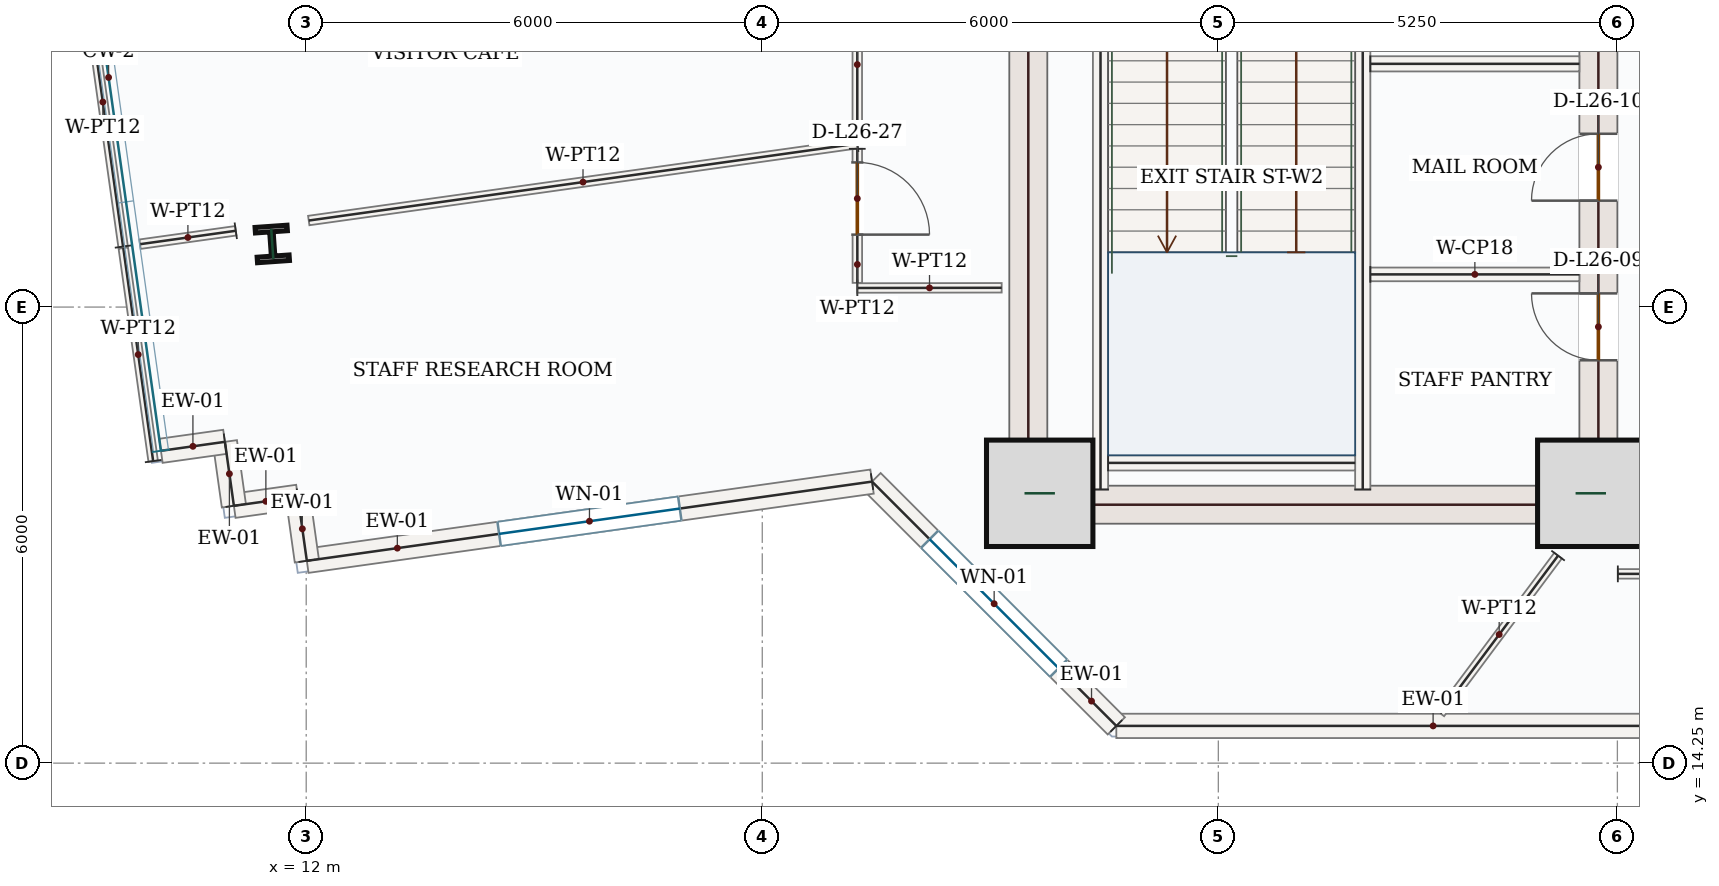
"""IFC4 building model, lengths in metres.
Left out: names, types, materials, properties, quantities, classifications, styles, units other than length and angle.
Written with IfcOpenShell. Run it as: python <this file> out.ifc"""

import sys

from ifc_helpers import new_model, si_unit, direction, frame, frame_2d, origin, origin_2d, place, context, subcontext, project, spatial, rectangle, i_section, extrude, source, transform, mapped, element, fill, save


model = new_model("IFC4")
c1 = context("Model", 3, precision=1e-05, world=origin(), true_north=direction((0.0, 1.0)))
c2 = subcontext(c1, "Body", "Model", "MODEL_VIEW")
j1 = project(units=[si_unit("LENGTHUNIT", "METRE"), si_unit("PLANEANGLEUNIT", "RADIAN")], contexts=[c1])
p1 = place(None, origin())
s1 = spatial("IfcSite", under=j1, at=p1, CompositionType="ELEMENT")
p2 = place(p1, origin())
s2 = spatial("IfcBuilding", under=s1, at=p2, CompositionType="ELEMENT")
p3 = place(p2, frame((0.0, 0.0, 117.3)))
s3 = spatial("IfcBuildingStorey", under=s2, at=p3, CompositionType="ELEMENT", Elevation=117.3)
m1 = source(origin(), c2, "Body", "SweptSolid", [
    extrude(rectangle(XDim=8.55, YDim=0.5, at=frame_2d((4.275, 0.0))), origin(), (0.0, 0.0, 1.0), 3.95),
])
p4 = place(p3, frame((21.5, 17.4, 0.0), z_axis=(0.0, 0.0, 1.0), x_axis=(0.0, 1.0, 0.0)))
e1 = element("IfcWall", 1, at=p4, inside=s3, PredefinedType="SHEAR", context=c2, shape_type="MappedRepresentation", body=[
    mapped(m1, transform((0.0, 0.0, 0.0), x_axis=(1.0, 0.0, 0.0), y_axis=(0.0, 1.0, 0.0), z_axis=(0.0, 0.0, 1.0), scale=1.0)),
])
p5 = place(p3, frame((29.0, 17.4, 0.0), z_axis=(0.0, 0.0, 1.0), x_axis=(0.0, 1.0, 0.0)))
e2 = element("IfcWall", 2, at=p5, inside=s3, PredefinedType="SHEAR", context=c2, shape_type="SweptSolid", body=[
    extrude(rectangle(XDim=8.55, YDim=0.5, at=frame_2d((4.275, 0.0))), origin(), (0.0, 0.0, 1.0), 3.95),
])
p6 = place(p5, frame((6.65, 0.0, 0.0)))
e3 = element("IfcOpeningElement", 3, at=p6, cuts=e2, PredefinedType="OPENING", context=c2, shape_type="SweptSolid", body=[
    extrude(rectangle(XDim=1.1, YDim=2.2, at=frame_2d((0.55, 1.1))), frame((0.0, 0.26, 0.0), z_axis=(0.0, -1.0, 0.0), x_axis=(1.0, 0.0, 0.0)), (0.0, 0.0, 1.0), 0.52),
])
p7 = place(p5, frame((2.15, 0.0, 0.0)))
e4 = element("IfcOpeningElement", 4, at=p7, cuts=e2, PredefinedType="OPENING", context=c2, shape_type="SweptSolid", body=[
    extrude(rectangle(XDim=0.88, YDim=2.1, at=frame_2d((0.44, 1.05))), frame((0.0, 0.26, 0.0), z_axis=(0.0, -1.0, 0.0), x_axis=(1.0, 0.0, 0.0)), (0.0, 0.0, 1.0), 0.52),
])
p8 = place(p5, frame((4.25, 0.0, 0.0)))
e5 = element("IfcOpeningElement", 5, at=p8, cuts=e2, PredefinedType="OPENING", context=c2, shape_type="SweptSolid", body=[
    extrude(rectangle(XDim=0.88, YDim=2.1, at=frame_2d((0.44, 1.05))), frame((0.0, 0.26, 0.0), z_axis=(0.0, -1.0, 0.0), x_axis=(1.0, 0.0, 0.0)), (0.0, 0.0, 1.0), 0.52),
])
m2 = source(origin(), c2, "Body", "SweptSolid", [
    extrude(rectangle(XDim=7.0, YDim=0.5, at=frame_2d((3.5, 0.0))), origin(), (0.0, 0.0, 1.0), 3.95),
])
p9 = place(p3, frame((21.75, 17.65, 0.0), z_axis=(0.0, 0.0, 1.0), x_axis=(1.0, 0.0, 0.0)))
e6 = element("IfcWall", 6, at=p9, inside=s3, PredefinedType="SHEAR", context=c2, shape_type="MappedRepresentation", body=[
    mapped(m2, transform((0.0, 0.0, 0.0), x_axis=(1.0, 0.0, 0.0), y_axis=(0.0, 1.0, 0.0), z_axis=(0.0, 0.0, 1.0), scale=1.0)),
])
m3 = source(origin(), c2, "Body", "SweptSolid", [
    extrude(rectangle(XDim=1.4, YDim=1.4, at=origin_2d()), origin(), (0.0, 0.0, 1.0), 4.2),
])
for number, where, z_axis, x_axis in (
    (7, (21.65, 17.8, 0.0), (0.0, 0.0, 1.0), (1.0, 0.0, 0.0)),
    (8, (28.9, 17.8, 0.0), (0.0, 0.0, 1.0), (1.0, 0.0, 0.0)),
):
    element("IfcColumn", number, at=place(p3, frame(where, z_axis=z_axis, x_axis=x_axis)), inside=s3, PredefinedType="COLUMN", context=c2, shape_type="MappedRepresentation", body=[
        mapped(m3, transform((0.0, 0.0, 0.0), x_axis=(1.0, 0.0, 0.0), y_axis=(0.0, 1.0, 0.0), z_axis=(0.0, 0.0, 1.0), scale=1.0)),
    ])
m4 = source(origin(), c2, "Body", "SweptSolid", [
    extrude(i_section(OverallWidth=0.421, OverallDepth=0.465, WebThickness=0.045, FlangeThickness=0.073, FilletRadius=0.018, at=origin_2d()), origin(), (0.0, 0.0, 1.0), 4.2),
])
p10 = place(p3, frame((11.553, 21.08, 0.0), z_axis=(0.0, 0.0, 1.0), x_axis=(0.99756405026, 0.069756473744, 0.0)))
e9 = element("IfcColumn", 9, at=p10, inside=s3, PredefinedType="COLUMN", context=c2, shape_type="MappedRepresentation", body=[
    mapped(m4, transform((0.0, 0.0, 0.0), x_axis=(1.0, 0.0, 0.0), y_axis=(0.0, 1.0, 0.0), z_axis=(0.0, 0.0, 1.0), scale=1.0)),
])
m5 = source(origin(), c2, "Body", "SweptSolid", [
    extrude(rectangle(XDim=8.335, YDim=0.32, at=frame_2d((4.168, 0.0))), origin(), (0.0, 0.0, 1.0), 3.95),
])
p11 = place(p3, frame((30.993, 14.74, 0.0), z_axis=(0.0, 0.0, 1.0), x_axis=(-1.0, 0.0, 0.0)))
e10 = element("IfcWall", 10, at=p11, inside=s3, PredefinedType="SOLIDWALL", context=c2, shape_type="MappedRepresentation", body=[
    mapped(m5, transform((0.0, 0.0, 0.0), x_axis=(1.0, 0.0, 0.0), y_axis=(0.0, 1.0, 0.0), z_axis=(0.0, 0.0, 1.0), scale=1.0)),
])
p12 = place(p3, frame((22.658, 14.74, 0.0), z_axis=(0.0, 0.0, 1.0), x_axis=(-0.707106781187, 0.707106781187, 0.0)))
e11 = element("IfcWall", 11, at=p12, inside=s3, PredefinedType="SOLIDWALL", context=c2, shape_type="SweptSolid", body=[
    extrude(rectangle(XDim=4.545, YDim=0.32, at=frame_2d((2.272, 0.0))), origin(), (0.0, 0.0, 1.0), 3.95),
])
p13 = place(p12, frame((1.073, 0.0, 0.85)))
e12 = element("IfcOpeningElement", 12, at=p13, cuts=e11, PredefinedType="OPENING", context=c2, shape_type="SweptSolid", body=[
    extrude(rectangle(XDim=2.4, YDim=1.8, at=frame_2d((1.2, 0.9))), frame((0.0, 0.17, 0.0), z_axis=(0.0, -1.0, 0.0), x_axis=(1.0, 0.0, 0.0)), (0.0, 0.0, 1.0), 0.34),
])
p14 = place(p3, frame((19.444, 17.954, 0.0), z_axis=(0.0, 0.0, 1.0), x_axis=(-0.990319321248, -0.138807931917, 0.0)))
e13 = element("IfcWall", 13, at=p14, inside=s3, PredefinedType="SOLIDWALL", context=c2, shape_type="SweptSolid", body=[
    extrude(rectangle(XDim=7.509, YDim=0.32, at=frame_2d((3.754, 0.0))), origin(), (0.0, 0.0, 1.0), 3.95),
])
p15 = place(p14, frame((2.554, 0.0, 0.85)))
e14 = element("IfcOpeningElement", 14, at=p15, cuts=e13, PredefinedType="OPENING", context=c2, shape_type="SweptSolid", body=[
    extrude(rectangle(XDim=2.4, YDim=1.8, at=frame_2d((1.2, 0.9))), frame((0.0, 0.17, 0.0), z_axis=(0.0, -1.0, 0.0), x_axis=(1.0, 0.0, 0.0)), (0.0, 0.0, 1.0), 0.34),
])
m6 = source(origin(), c2, "Body", "SweptSolid", [
    extrude(rectangle(XDim=0.85, YDim=0.32, at=frame_2d((0.425, 0.0))), origin(), (0.0, 0.0, 1.0), 3.95),
])
for number, where, z_axis, x_axis in (
    (15, (12.008, 16.912, 0.0), (0.0, 0.0, 1.0), (-0.139, 0.99, 0.0)),
    (16, (11.89, 17.753, 0.0), (0.0, 0.0, 1.0), (-0.99, -0.139, 0.0)),
):
    element("IfcWall", number, at=place(p3, frame(where, z_axis=z_axis, x_axis=x_axis)), inside=s3, PredefinedType="SOLIDWALL", context=c2, shape_type="MappedRepresentation", body=[
        mapped(m6, transform((0.0, 0.0, 0.0), x_axis=(1.0, 0.0, 0.0), y_axis=(0.0, 1.0, 0.0), z_axis=(0.0, 0.0, 1.0), scale=1.0)),
    ])
m7 = source(origin(), c2, "Body", "SweptSolid", [
    extrude(rectangle(XDim=0.85, YDim=0.32, at=frame_2d((0.425, 0.0))), origin(), (0.0, 0.0, 1.0), 3.95),
])
p16 = place(p3, frame((11.048, 17.635, 0.0), z_axis=(0.0, 0.0, 1.0), x_axis=(-0.138766190202, 0.990325171071, 0.0)))
e17 = element("IfcWall", 17, at=p16, inside=s3, PredefinedType="SOLIDWALL", context=c2, shape_type="MappedRepresentation", body=[
    mapped(m7, transform((0.0, 0.0, 0.0), x_axis=(1.0, 0.0, 0.0), y_axis=(0.0, 1.0, 0.0), z_axis=(0.0, 0.0, 1.0), scale=1.0)),
])
p17 = place(p3, frame((10.93, 18.477, 0.0), z_axis=(0.0, 0.0, 1.0), x_axis=(-0.990330700987, -0.138726719425, 0.0)))
e18 = element("IfcWall", 18, at=p17, inside=s3, PredefinedType="SOLIDWALL", context=c2, shape_type="MappedRepresentation", body=[
    mapped(m6, transform((0.0, 0.0, 0.0), x_axis=(1.0, 0.0, 0.0), y_axis=(0.0, 1.0, 0.0), z_axis=(0.0, 0.0, 1.0), scale=1.0)),
])
m8 = source(origin(), c2, "Body", "SweptSolid", [
    extrude(rectangle(XDim=7.87, YDim=0.2, at=frame_2d((3.935, 0.0))), origin(), (0.0, 0.0, 1.0), 3.95),
])
p18 = place(p3, frame((22.45, 17.85, 0.0), z_axis=(0.0, 0.0, 1.0), x_axis=(0.0, 1.0, 0.0)))
e19 = element("IfcWall", 19, at=p18, inside=s3, PredefinedType="SOLIDWALL", context=c2, shape_type="MappedRepresentation", body=[
    mapped(m8, transform((0.0, 0.0, 0.0), x_axis=(1.0, 0.0, 0.0), y_axis=(0.0, 1.0, 0.0), z_axis=(0.0, 0.0, 1.0), scale=1.0)),
])
p19 = place(p3, frame((25.9, 17.85, 0.0), z_axis=(0.0, 0.0, 1.0), x_axis=(0.0, 1.0, 0.0)))
e20 = element("IfcWall", 20, at=p19, inside=s3, PredefinedType="SOLIDWALL", context=c2, shape_type="SweptSolid", body=[
    extrude(rectangle(XDim=8.0, YDim=0.2, at=frame_2d((4.0, 0.0))), origin(), (0.0, 0.0, 1.0), 3.95),
])
p20 = place(p19, frame((6.3, 0.0, 0.0)))
e21 = element("IfcOpeningElement", 21, at=p20, cuts=e20, PredefinedType="OPENING", context=c2, shape_type="SweptSolid", body=[
    extrude(rectangle(XDim=1.05, YDim=2.15, at=frame_2d((0.525, 1.075))), frame((0.0, 0.11, 0.0), z_axis=(0.0, -1.0, 0.0), x_axis=(1.0, 0.0, 0.0)), (0.0, 0.0, 1.0), 0.22),
])
m9 = source(origin(), c2, "Body", "SweptSolid", [
    extrude(rectangle(XDim=3.25, YDim=0.2, at=frame_2d((1.625, 0.0))), origin(), (0.0, 0.0, 1.0), 3.95),
])
p21 = place(p3, frame((22.55, 18.2, 0.0), z_axis=(0.0, 0.0, 1.0), x_axis=(1.0, 0.0, 0.0)))
e22 = element("IfcWall", 22, at=p21, inside=s3, PredefinedType="SOLIDWALL", context=c2, shape_type="MappedRepresentation", body=[
    mapped(m9, transform((0.0, 0.0, 0.0), x_axis=(1.0, 0.0, 0.0), y_axis=(0.0, 1.0, 0.0), z_axis=(0.0, 0.0, 1.0), scale=1.0)),
])
m10 = source(origin(), c2, "Body", "SweptSolid", [
    extrude(rectangle(XDim=2.75, YDim=0.2, at=frame_2d((1.375, 0.0))), origin(), (0.0, 0.0, 1.0), 3.95),
])
p22 = place(p3, frame((26.0, 23.45, 0.0), z_axis=(0.0, 0.0, 1.0), x_axis=(1.0, 0.0, 0.0)))
e23 = element("IfcWall", 23, at=p22, inside=s3, PredefinedType="SOLIDWALL", context=c2, shape_type="MappedRepresentation", body=[
    mapped(m10, transform((0.0, 0.0, 0.0), x_axis=(1.0, 0.0, 0.0), y_axis=(0.0, 1.0, 0.0), z_axis=(0.0, 0.0, 1.0), scale=1.0)),
])
m11 = source(origin(), c2, "Body", "SweptSolid", [
    extrude(rectangle(XDim=2.75, YDim=0.18, at=frame_2d((1.375, 0.0))), origin(), (0.0, 0.0, 1.0), 3.95),
])
p23 = place(p3, frame((26.0, 20.68, 0.0), z_axis=(0.0, 0.0, 1.0), x_axis=(1.0, 0.0, 0.0)))
e24 = element("IfcWall", 24, at=p23, inside=s3, PredefinedType="PARTITIONING", context=c2, shape_type="MappedRepresentation", body=[
    mapped(m11, transform((0.0, 0.0, 0.0), x_axis=(1.0, 0.0, 0.0), y_axis=(0.0, 1.0, 0.0), z_axis=(0.0, 0.0, 1.0), scale=1.0)),
])
m12 = source(origin(), c2, "Body", "SweptSolid", [
    extrude(rectangle(XDim=1.272, YDim=0.125, at=frame_2d((0.636, 0.0))), origin(), (0.0, 0.0, 1.0), 3.95),
])
p24 = place(p3, frame((11.073, 21.254, 0.0), z_axis=(0.0, 0.0, 1.0), x_axis=(-0.990325928558, -0.138760784176, 0.0)))
e25 = element("IfcWall", 25, at=p24, inside=s3, PredefinedType="PARTITIONING", context=c2, shape_type="MappedRepresentation", body=[
    mapped(m12, transform((0.0, 0.0, 0.0), x_axis=(1.0, 0.0, 0.0), y_axis=(0.0, 1.0, 0.0), z_axis=(0.0, 0.0, 1.0), scale=1.0)),
])
m13 = source(origin(), c2, "Body", "SweptSolid", [
    extrude(rectangle(XDim=3.84, YDim=0.125, at=frame_2d((1.92, 0.0))), origin(), (0.0, 0.0, 1.0), 3.95),
])
p25 = place(p3, frame((9.591, 21.046, 0.0), z_axis=(0.0, 0.0, 1.0), x_axis=(-0.138795007241, 0.990321132747, 0.0)))
e26 = element("IfcWall", 26, at=p25, inside=s3, PredefinedType="PARTITIONING", context=c2, shape_type="MappedRepresentation", body=[
    mapped(m13, transform((0.0, 0.0, 0.0), x_axis=(1.0, 0.0, 0.0), y_axis=(0.0, 1.0, 0.0), z_axis=(0.0, 0.0, 1.0), scale=1.0)),
])
p26 = place(p3, frame((19.25, 26.209, 0.0), z_axis=(0.0, 0.0, 1.0), x_axis=(0.0, -1.0, 0.0)))
e27 = element("IfcWall", 27, at=p26, inside=s3, PredefinedType="PARTITIONING", context=c2, shape_type="SweptSolid", body=[
    extrude(rectangle(XDim=3.809, YDim=0.125, at=frame_2d((1.905, 0.0))), origin(), (0.0, 0.0, 1.0), 3.95),
])
p27 = place(p26, frame((0.629, 0.0, 0.0)))
e28 = element("IfcOpeningElement", 28, at=p27, cuts=e27, PredefinedType="OPENING", context=c2, shape_type="SweptSolid", body=[
    extrude(rectangle(XDim=0.95, YDim=2.15, at=frame_2d((0.475, 1.075))), frame((0.0, 0.073, 0.0), z_axis=(0.0, -1.0, 0.0), x_axis=(1.0, 0.0, 0.0)), (0.0, 0.0, 1.0), 0.145),
])
m14 = source(origin(), c2, "Body", "SweptSolid", [
    extrude(rectangle(XDim=7.287, YDim=0.125, at=frame_2d((3.644, 0.0))), origin(), (0.0, 0.0, 1.0), 3.95),
])
p28 = place(p3, frame((19.25, 22.4, 0.0), z_axis=(0.0, 0.0, 1.0), x_axis=(-0.990314677425, -0.138841059045, 0.0)))
e29 = element("IfcWall", 29, at=p28, inside=s3, PredefinedType="PARTITIONING", context=c2, shape_type="MappedRepresentation", body=[
    mapped(m14, transform((0.0, 0.0, 0.0), x_axis=(1.0, 0.0, 0.0), y_axis=(0.0, 1.0, 0.0), z_axis=(0.0, 0.0, 1.0), scale=1.0)),
])
m15 = source(origin(), c2, "Body", "SweptSolid", [
    extrude(rectangle(XDim=1.898, YDim=0.125, at=frame_2d((0.949, 0.0))), origin(), (0.0, 0.0, 1.0), 3.95),
])
p29 = place(p3, frame((19.251, 20.501, 0.0), z_axis=(0.0, 0.0, 1.0), x_axis=(0.999998999442, 0.001414607638, 0.0)))
e30 = element("IfcWall", 30, at=p29, inside=s3, PredefinedType="PARTITIONING", context=c2, shape_type="MappedRepresentation", body=[
    mapped(m15, transform((0.0, 0.0, 0.0), x_axis=(1.0, 0.0, 0.0), y_axis=(0.0, 1.0, 0.0), z_axis=(0.0, 0.0, 1.0), scale=1.0)),
])
m16 = source(origin(), c2, "Body", "SweptSolid", [
    extrude(rectangle(XDim=2.59, YDim=0.125, at=frame_2d((1.295, 0.0))), origin(), (0.0, 0.0, 1.0), 3.95),
])
p30 = place(p3, frame((28.47, 16.98, 0.0), z_axis=(0.0, 0.0, 1.0), x_axis=(-0.598354601134, -0.801231409333, 0.0)))
e31 = element("IfcWall", 31, at=p30, inside=s3, PredefinedType="PARTITIONING", context=c2, shape_type="MappedRepresentation", body=[
    mapped(m16, transform((0.0, 0.0, 0.0), x_axis=(1.0, 0.0, 0.0), y_axis=(0.0, 1.0, 0.0), z_axis=(0.0, 0.0, 1.0), scale=1.0)),
])
m17 = source(origin(), c2, "Body", "SweptSolid", [
    extrude(rectangle(XDim=2.83, YDim=0.125, at=frame_2d((1.415, 0.0))), origin(), (0.0, 0.0, 1.0), 3.95),
])
p31 = place(p3, frame((9.987, 18.224, 0.0), z_axis=(0.0, 0.0, 1.0), x_axis=(-0.138811993372, 0.990318751966, 0.0)))
e32 = element("IfcWall", 32, at=p31, inside=s3, PredefinedType="PARTITIONING", context=c2, shape_type="MappedRepresentation", body=[
    mapped(m17, transform((0.0, 0.0, 0.0), x_axis=(1.0, 0.0, 0.0), y_axis=(0.0, 1.0, 0.0), z_axis=(0.0, 0.0, 1.0), scale=1.0)),
])
p32 = place(p3, frame((19.25, 22.332, 0.0), z_axis=(0.0, 0.0, 1.0), x_axis=(0.00055378643, -0.99999984666, 0.0)))
e33 = element("IfcWall", 33, at=p32, inside=s3, PredefinedType="PARTITIONING", context=c2, shape_type="SweptSolid", body=[
    extrude(rectangle(XDim=1.763, YDim=0.125, at=frame_2d((0.882, 0.0))), origin(), (0.0, 0.0, 1.0), 3.95),
])
p33 = place(p32, frame((0.179, 0.0, 0.0)))
e34 = element("IfcOpeningElement", 34, at=p33, cuts=e33, PredefinedType="OPENING", context=c2, shape_type="SweptSolid", body=[
    extrude(rectangle(XDim=0.95, YDim=2.15, at=frame_2d((0.475, 1.075))), frame((0.0, 0.073, 0.0), z_axis=(0.0, -1.0, 0.0), x_axis=(1.0, 0.0, 0.0)), (0.0, 0.0, 1.0), 0.145),
])
p34 = place(p3, frame((29.256, 16.74, 0.0), z_axis=(0.0, 0.0, 1.0), x_axis=(1.0, 0.0, 0.0)))
e35 = element("IfcWall", 35, at=p34, inside=s3, PredefinedType="PARTITIONING", context=c2, shape_type="SweptSolid", body=[
    extrude(rectangle(XDim=13.488, YDim=0.125, at=frame_2d((6.744, 0.0))), origin(), (0.0, 0.0, 1.0), 3.95),
])
p35 = place(p34, frame((6.269, 0.0, 0.0)))
e36 = element("IfcOpeningElement", 36, at=p35, cuts=e35, PredefinedType="OPENING", context=c2, shape_type="SweptSolid", body=[
    extrude(rectangle(XDim=0.95, YDim=2.15, at=frame_2d((0.475, 1.075))), frame((0.0, 0.073, 0.0), z_axis=(0.0, -1.0, 0.0), x_axis=(1.0, 0.0, 0.0)), (0.0, 0.0, 1.0), 0.145),
])
m18 = source(origin(), c2, "Body", "SweptSolid", [
    extrude(rectangle(XDim=2.4, YDim=1.8, at=frame_2d((1.2, 0.9))), frame((0.0, 0.03, 0.0), z_axis=(0.0, -1.0, 0.0), x_axis=(1.0, 0.0, 0.0)), (0.0, 0.0, 1.0), 0.06),
])
p36 = place(p13, origin())
e37 = element("IfcWindow", 37, at=p36, inside=s3, PartitioningType="DOUBLE_PANEL_VERTICAL", PredefinedType="WINDOW", context=c2, shape_type="MappedRepresentation", body=[
    mapped(m18, transform((0.0, 0.0, 0.0), x_axis=(1.0, 0.0, 0.0), y_axis=(0.0, 1.0, 0.0), z_axis=(0.0, 0.0, 1.0), scale=1.0)),
])
fill(e12, e37)
p37 = place(p15, origin())
e38 = element("IfcWindow", 38, at=p37, inside=s3, PartitioningType="DOUBLE_PANEL_VERTICAL", PredefinedType="WINDOW", context=c2, shape_type="MappedRepresentation", body=[
    mapped(m18, transform((0.0, 0.0, 0.0), x_axis=(1.0, 0.0, 0.0), y_axis=(0.0, 1.0, 0.0), z_axis=(0.0, 0.0, 1.0), scale=1.0)),
])
fill(e14, e38)
m19 = source(origin(), c2, "Body", "SweptSolid", [
    extrude(rectangle(XDim=0.88, YDim=2.1, at=frame_2d((0.44, 1.05))), frame((0.0, 0.025, 0.0), z_axis=(0.0, -1.0, 0.0), x_axis=(1.0, 0.0, 0.0)), (0.0, 0.0, 1.0), 0.05),
])
p38 = place(p7, origin())
e39 = element("IfcDoor", 39, at=p38, inside=s3, OperationType="SINGLE_SWING_RIGHT", PredefinedType="DOOR", context=c2, shape_type="MappedRepresentation", body=[
    mapped(m19, transform((0.0, 0.0, 0.0), x_axis=(1.0, 0.0, 0.0), y_axis=(0.0, 1.0, 0.0), z_axis=(0.0, 0.0, 1.0), scale=1.0)),
])
fill(e4, e39)
p39 = place(p8, origin())
e40 = element("IfcDoor", 40, at=p39, inside=s3, OperationType="SINGLE_SWING_LEFT", PredefinedType="DOOR", context=c2, shape_type="MappedRepresentation", body=[
    mapped(m19, transform((0.0, 0.0, 0.0), x_axis=(1.0, 0.0, 0.0), y_axis=(0.0, 1.0, 0.0), z_axis=(0.0, 0.0, 1.0), scale=1.0)),
])
fill(e5, e40)
m20 = source(origin(), c2, "Body", "SweptSolid", [
    extrude(rectangle(XDim=0.95, YDim=2.15, at=frame_2d((0.475, 1.075))), frame((0.0, 0.025, 0.0), z_axis=(0.0, -1.0, 0.0), x_axis=(1.0, 0.0, 0.0)), (0.0, 0.0, 1.0), 0.05),
])
p40 = place(p33, origin())
e41 = element("IfcDoor", 41, at=p40, inside=s3, OperationType="SINGLE_SWING_RIGHT", PredefinedType="DOOR", context=c2, shape_type="MappedRepresentation", body=[
    mapped(m20, transform((0.0, 0.0, 0.0), x_axis=(1.0, 0.0, 0.0), y_axis=(0.0, 1.0, 0.0), z_axis=(0.0, 0.0, 1.0), scale=1.0)),
])
fill(e34, e41)
save(model, sys.argv[1])
